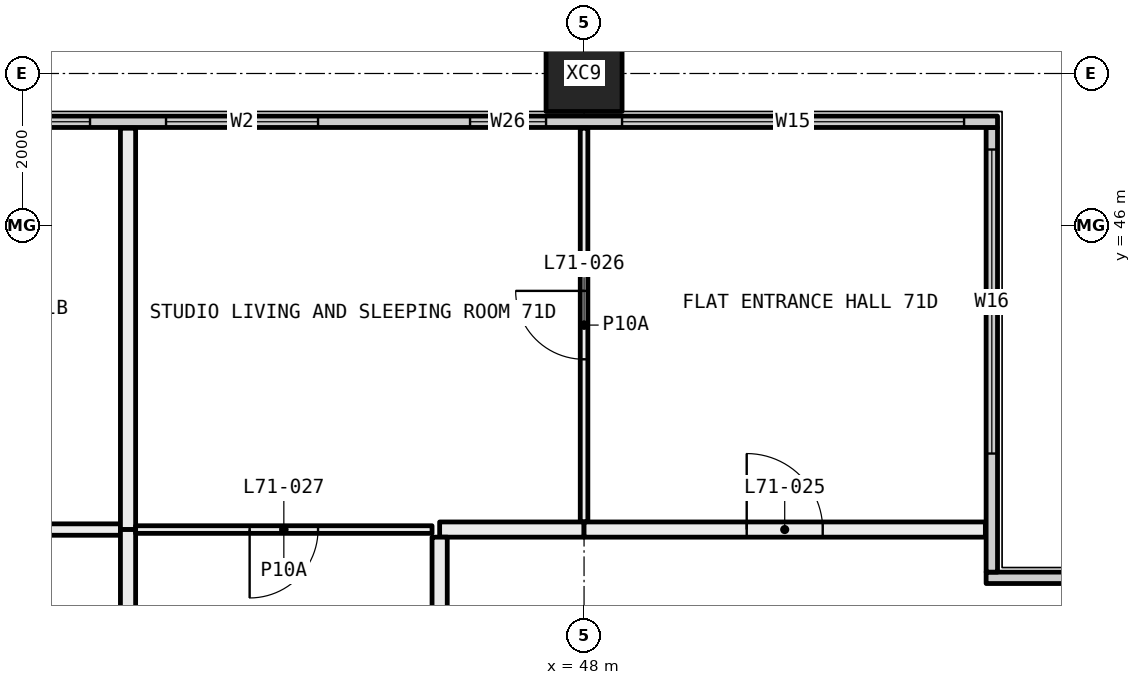
"""IFC4 building model, lengths in metres.
Left out: names, types, materials, properties, quantities, classifications, styles, units other than length and angle.
Written with IfcOpenShell. Run it as: python <this file> out.ifc"""

import sys

from ifc_helpers import new_model, si_unit, direction, frame, frame_2d, origin, origin_2d, place, context, subcontext, project, spatial, rectangle, hollow_rectangle, extrude, element, fill, save


model = new_model("IFC4")
c1 = context("Model", 3, precision=1e-05, world=origin(), true_north=direction((0.0, 1.0)))
c2 = subcontext(c1, "Body", "Model", "MODEL_VIEW")
j1 = project(units=[si_unit("LENGTHUNIT", "METRE"), si_unit("PLANEANGLEUNIT", "RADIAN")], contexts=[c1])
p1 = place(None, origin())
s1 = spatial("IfcSite", under=j1, at=p1, CompositionType="ELEMENT")
p2 = place(p1, origin())
s2 = spatial("IfcBuilding", under=s1, at=p2, CompositionType="ELEMENT")
p3 = place(p2, frame((0.0, 0.0, 262.8)))
s3 = spatial("IfcBuildingStorey", under=s2, at=p3, CompositionType="ELEMENT", Elevation=262.8)
p4 = place(p3, frame((48.0, 48.0, -0.4), z_axis=(0.0, 0.0, 1.0), x_axis=(1.0, 0.0, 0.0)))
e1 = element("IfcColumn", 1, at=p4, inside=s3, PredefinedType="COLUMN", context=c2, shape_type="SweptSolid", body=[
    extrude(hollow_rectangle(XDim=1.0, YDim=1.0, WallThickness=0.036, at=origin_2d()), origin(), (0.0, 0.0, 1.0), 3.45),
])
p5 = place(p3, frame((53.29, 41.365, 0.0), z_axis=(0.0, 0.0, 1.0), x_axis=(1.0, 0.0, 0.0)))
e2 = element("IfcWall", 2, at=p5, inside=s3, PredefinedType="ELEMENTEDWALL", context=c2, shape_type="SweptSolid", body=[
    extrude(rectangle(XDim=6.15, YDim=0.15, at=frame_2d((3.075, 0.0))), origin(), (0.0, 0.0, 1.0), 3.05),
])
p6 = place(p5, frame((1.71, 0.0, 0.45)))
e3 = element("IfcOpeningElement", 3, at=p6, cuts=e2, PredefinedType="OPENING", context=c2, shape_type="SweptSolid", body=[
    extrude(rectangle(XDim=4.0, YDim=2.55, at=frame_2d((2.0, 1.275))), frame((0.0, 0.085, 0.0), z_axis=(0.0, -1.0, 0.0), x_axis=(1.0, 0.0, 0.0)), (0.0, 0.0, 1.0), 0.17),
])
p7 = place(p3, frame((53.365, 41.44, 0.0), z_axis=(0.0, 0.0, 1.0), x_axis=(0.0, 1.0, 0.0)))
e4 = element("IfcWall", 4, at=p7, inside=s3, PredefinedType="ELEMENTEDWALL", context=c2, shape_type="SweptSolid", body=[
    extrude(rectangle(XDim=5.85, YDim=0.15, at=frame_2d((2.925, 0.0))), origin(), (0.0, 0.0, 1.0), 3.05),
])
p8 = place(p7, frame((1.56, 0.0, 0.45)))
e5 = element("IfcOpeningElement", 5, at=p8, cuts=e4, PredefinedType="OPENING", context=c2, shape_type="SweptSolid", body=[
    extrude(rectangle(XDim=4.0, YDim=2.55, at=frame_2d((2.0, 1.275))), frame((0.0, 0.085, 0.0), z_axis=(0.0, -1.0, 0.0), x_axis=(1.0, 0.0, 0.0)), (0.0, 0.0, 1.0), 0.17),
])
p9 = place(p3, frame((18.56, 47.365, 0.0), z_axis=(0.0, 0.0, 1.0), x_axis=(1.0, 0.0, 0.0)))
e6 = element("IfcWall", 6, at=p9, inside=s3, PredefinedType="ELEMENTEDWALL", context=c2, shape_type="SweptSolid", body=[
    extrude(rectangle(XDim=34.88, YDim=0.15, at=frame_2d((17.44, 0.0))), origin(), (0.0, 0.0, 1.0), 3.05),
])
p10 = place(p9, frame((0.44, 0.0, 0.45)))
e7 = element("IfcOpeningElement", 7, at=p10, cuts=e6, PredefinedType="OPENING", context=c2, shape_type="SweptSolid", body=[
    extrude(rectangle(XDim=4.5, YDim=2.55, at=frame_2d((2.25, 1.275))), frame((0.0, 0.085, 0.0), z_axis=(0.0, -1.0, 0.0), x_axis=(1.0, 0.0, 0.0)), (0.0, 0.0, 1.0), 0.17),
])
p11 = place(p9, frame((5.94, 0.0, 0.45)))
e8 = element("IfcOpeningElement", 8, at=p11, cuts=e6, PredefinedType="OPENING", context=c2, shape_type="SweptSolid", body=[
    extrude(rectangle(XDim=1.0, YDim=2.55, at=frame_2d((0.5, 1.275))), frame((0.0, 0.085, 0.0), z_axis=(0.0, -1.0, 0.0), x_axis=(1.0, 0.0, 0.0)), (0.0, 0.0, 1.0), 0.17),
])
p12 = place(p9, frame((8.94, 0.0, 0.45)))
e9 = element("IfcOpeningElement", 9, at=p12, cuts=e6, PredefinedType="OPENING", context=c2, shape_type="SweptSolid", body=[
    extrude(rectangle(XDim=2.0, YDim=2.55, at=frame_2d((1.0, 1.275))), frame((0.0, 0.085, 0.0), z_axis=(0.0, -1.0, 0.0), x_axis=(1.0, 0.0, 0.0)), (0.0, 0.0, 1.0), 0.17),
])
p13 = place(p9, frame((11.94, 0.0, 0.45)))
e10 = element("IfcOpeningElement", 10, at=p13, cuts=e6, PredefinedType="OPENING", context=c2, shape_type="SweptSolid", body=[
    extrude(rectangle(XDim=2.0, YDim=2.55, at=frame_2d((1.0, 1.275))), frame((0.0, 0.085, 0.0), z_axis=(0.0, -1.0, 0.0), x_axis=(1.0, 0.0, 0.0)), (0.0, 0.0, 1.0), 0.17),
])
p14 = place(p9, frame((15.94, 0.0, 0.45)))
e11 = element("IfcOpeningElement", 11, at=p14, cuts=e6, PredefinedType="OPENING", context=c2, shape_type="SweptSolid", body=[
    extrude(rectangle(XDim=1.0, YDim=2.55, at=frame_2d((0.5, 1.275))), frame((0.0, 0.085, 0.0), z_axis=(0.0, -1.0, 0.0), x_axis=(1.0, 0.0, 0.0)), (0.0, 0.0, 1.0), 0.17),
])
p15 = place(p9, frame((17.94, 0.0, 0.45)))
e12 = element("IfcOpeningElement", 12, at=p15, cuts=e6, PredefinedType="OPENING", context=c2, shape_type="SweptSolid", body=[
    extrude(rectangle(XDim=1.0, YDim=2.55, at=frame_2d((0.5, 1.275))), frame((0.0, 0.085, 0.0), z_axis=(0.0, -1.0, 0.0), x_axis=(1.0, 0.0, 0.0)), (0.0, 0.0, 1.0), 0.17),
])
p16 = place(p9, frame((20.94, 0.0, 0.45)))
e13 = element("IfcOpeningElement", 13, at=p16, cuts=e6, PredefinedType="OPENING", context=c2, shape_type="SweptSolid", body=[
    extrude(rectangle(XDim=2.0, YDim=2.55, at=frame_2d((1.0, 1.275))), frame((0.0, 0.085, 0.0), z_axis=(0.0, -1.0, 0.0), x_axis=(1.0, 0.0, 0.0)), (0.0, 0.0, 1.0), 0.17),
])
p17 = place(p9, frame((23.94, 0.0, 0.45)))
e14 = element("IfcOpeningElement", 14, at=p17, cuts=e6, PredefinedType="OPENING", context=c2, shape_type="SweptSolid", body=[
    extrude(rectangle(XDim=2.0, YDim=2.55, at=frame_2d((1.0, 1.275))), frame((0.0, 0.085, 0.0), z_axis=(0.0, -1.0, 0.0), x_axis=(1.0, 0.0, 0.0)), (0.0, 0.0, 1.0), 0.17),
])
p18 = place(p9, frame((27.94, 0.0, 0.45)))
e15 = element("IfcOpeningElement", 15, at=p18, cuts=e6, PredefinedType="OPENING", context=c2, shape_type="SweptSolid", body=[
    extrude(rectangle(XDim=1.0, YDim=2.55, at=frame_2d((0.5, 1.275))), frame((0.0, 0.085, 0.0), z_axis=(0.0, -1.0, 0.0), x_axis=(1.0, 0.0, 0.0)), (0.0, 0.0, 1.0), 0.17),
])
p19 = place(p9, frame((29.94, 0.0, 0.45)))
e16 = element("IfcOpeningElement", 16, at=p19, cuts=e6, PredefinedType="OPENING", context=c2, shape_type="SweptSolid", body=[
    extrude(rectangle(XDim=4.5, YDim=2.55, at=frame_2d((2.25, 1.275))), frame((0.0, 0.085, 0.0), z_axis=(0.0, -1.0, 0.0), x_axis=(1.0, 0.0, 0.0)), (0.0, 0.0, 1.0), 0.17),
])
p20 = place(p3, frame((36.0, 42.0, 0.0), z_axis=(0.0, 0.0, 1.0), x_axis=(1.0, 0.0, 0.0)))
e17 = element("IfcWall", 17, at=p20, inside=s3, PredefinedType="PARTITIONING", context=c2, shape_type="SweptSolid", body=[
    extrude(rectangle(XDim=5.9, YDim=0.15, at=frame_2d((2.95, 0.0))), origin(), (0.0, 0.0, 1.0), 2.45),
])
p21 = place(p20, frame((2.5, 0.0, 0.0)))
e18 = element("IfcOpeningElement", 18, at=p21, cuts=e17, PredefinedType="OPENING", context=c2, shape_type="SweptSolid", body=[
    extrude(rectangle(XDim=0.9, YDim=2.1, at=frame_2d((0.45, 1.05))), frame((0.0, 0.085, 0.0), z_axis=(0.0, -1.0, 0.0), x_axis=(1.0, 0.0, 0.0)), (0.0, 0.0, 1.0), 0.17),
])
p22 = place(p3, frame((42.0, 42.0, 0.0), z_axis=(0.0, 0.0, 1.0), x_axis=(0.0, 1.0, 0.0)))
e19 = element("IfcWall", 19, at=p22, inside=s3, PredefinedType="PARTITIONING", context=c2, shape_type="SweptSolid", body=[
    extrude(rectangle(XDim=5.28, YDim=0.2, at=frame_2d((2.64, 0.0))), origin(), (0.0, 0.0, 1.0), 3.05),
])
p23 = place(p3, frame((42.0, 38.1, 0.0), z_axis=(0.0, 0.0, 1.0), x_axis=(0.0, 1.0, 0.0)))
e20 = element("IfcWall", 20, at=p23, inside=s3, PredefinedType="PARTITIONING", context=c2, shape_type="SweptSolid", body=[
    extrude(rectangle(XDim=3.9, YDim=0.2, at=frame_2d((1.95, 0.0))), origin(), (0.0, 0.0, 1.0), 3.05),
])
p24 = place(p3, frame((48.0, 42.1, 0.0), z_axis=(0.0, 0.0, 1.0), x_axis=(0.0, 1.0, 0.0)))
e21 = element("IfcWall", 21, at=p24, inside=s3, PredefinedType="PARTITIONING", context=c2, shape_type="SweptSolid", body=[
    extrude(rectangle(XDim=5.18, YDim=0.1, at=frame_2d((2.59, 0.0))), origin(), (0.0, 0.0, 1.0), 3.05),
])
p25 = place(p24, frame((2.14, 0.0, 0.0)))
e22 = element("IfcOpeningElement", 22, at=p25, cuts=e21, PredefinedType="OPENING", context=c2, shape_type="SweptSolid", body=[
    extrude(rectangle(XDim=0.9, YDim=2.1, at=frame_2d((0.45, 1.05))), frame((0.0, 0.06, 0.0), z_axis=(0.0, -1.0, 0.0), x_axis=(1.0, 0.0, 0.0)), (0.0, 0.0, 1.0), 0.12),
])
p26 = place(p3, frame((42.1, 42.0, 0.0), z_axis=(0.0, 0.0, 1.0), x_axis=(1.0, 0.0, 0.0)))
e23 = element("IfcWall", 23, at=p26, inside=s3, PredefinedType="PARTITIONING", context=c2, shape_type="SweptSolid", body=[
    extrude(rectangle(XDim=3.9, YDim=0.1, at=frame_2d((1.95, 0.0))), origin(), (0.0, 0.0, 1.0), 3.05),
])
p27 = place(p26, frame((1.5, 0.0, 0.0)))
e24 = element("IfcOpeningElement", 24, at=p27, cuts=e23, PredefinedType="OPENING", context=c2, shape_type="SweptSolid", body=[
    extrude(rectangle(XDim=0.9, YDim=2.1, at=frame_2d((0.45, 1.05))), frame((0.0, 0.06, 0.0), z_axis=(0.0, -1.0, 0.0), x_axis=(1.0, 0.0, 0.0)), (0.0, 0.0, 1.0), 0.12),
])
p28 = place(p3, frame((46.1, 42.0, 0.0), z_axis=(0.0, 0.0, 1.0), x_axis=(1.0, 0.0, 0.0)))
e25 = element("IfcWall", 25, at=p28, inside=s3, PredefinedType="PARTITIONING", context=c2, shape_type="SweptSolid", body=[
    extrude(rectangle(XDim=1.9, YDim=0.2, at=frame_2d((0.95, 0.0))), origin(), (0.0, 0.0, 1.0), 3.05),
])
p29 = place(p3, frame((48.0, 42.0, 0.0), z_axis=(0.0, 0.0, 1.0), x_axis=(1.0, 0.0, 0.0)))
e26 = element("IfcWall", 26, at=p29, inside=s3, PredefinedType="PARTITIONING", context=c2, shape_type="SweptSolid", body=[
    extrude(rectangle(XDim=5.28, YDim=0.2, at=frame_2d((2.64, 0.0))), origin(), (0.0, 0.0, 1.0), 3.05),
])
p30 = place(p29, frame((2.14, 0.0, 0.0)))
e27 = element("IfcOpeningElement", 27, at=p30, cuts=e26, PredefinedType="OPENING", context=c2, shape_type="SweptSolid", body=[
    extrude(rectangle(XDim=1.0, YDim=2.1, at=frame_2d((0.5, 1.05))), frame((0.0, 0.11, 0.0), z_axis=(0.0, -1.0, 0.0), x_axis=(1.0, 0.0, 0.0)), (0.0, 0.0, 1.0), 0.22),
])
p31 = place(p3, frame((46.1, 36.1, 0.0), z_axis=(0.0, 0.0, 1.0), x_axis=(0.0, 1.0, 0.0)))
e28 = element("IfcWall", 28, at=p31, inside=s3, PredefinedType="PARTITIONING", context=c2, shape_type="SweptSolid", body=[
    extrude(rectangle(XDim=5.8, YDim=0.2, at=frame_2d((2.9, 0.0))), origin(), (0.0, 0.0, 1.0), 3.05),
])
p32 = place(p8, origin())
e29 = element("IfcWindow", 29, at=p32, inside=s3, PartitioningType="SINGLE_PANEL", PredefinedType="WINDOW", context=c2, shape_type="SweptSolid", body=[
    extrude(rectangle(XDim=4.0, YDim=2.55, at=frame_2d((2.0, 1.275))), frame((0.0, 0.03, 0.0), z_axis=(0.0, -1.0, 0.0), x_axis=(1.0, 0.0, 0.0)), (0.0, 0.0, 1.0), 0.06),
])
fill(e5, e29)
p33 = place(p16, origin())
e30 = element("IfcWindow", 30, at=p33, inside=s3, PartitioningType="SINGLE_PANEL", PredefinedType="WINDOW", context=c2, shape_type="SweptSolid", body=[
    extrude(rectangle(XDim=2.0, YDim=2.55, at=frame_2d((1.0, 1.275))), frame((0.0, 0.03, 0.0), z_axis=(0.0, -1.0, 0.0), x_axis=(1.0, 0.0, 0.0)), (0.0, 0.0, 1.0), 0.06),
])
fill(e13, e30)
p34 = place(p17, origin())
e31 = element("IfcWindow", 31, at=p34, inside=s3, PartitioningType="SINGLE_PANEL", PredefinedType="WINDOW", context=c2, shape_type="SweptSolid", body=[
    extrude(rectangle(XDim=2.0, YDim=2.55, at=frame_2d((1.0, 1.275))), frame((0.0, 0.03, 0.0), z_axis=(0.0, -1.0, 0.0), x_axis=(1.0, 0.0, 0.0)), (0.0, 0.0, 1.0), 0.06),
])
fill(e14, e31)
p35 = place(p18, origin())
e32 = element("IfcWindow", 32, at=p35, inside=s3, PartitioningType="SINGLE_PANEL", PredefinedType="WINDOW", context=c2, shape_type="SweptSolid", body=[
    extrude(rectangle(XDim=1.0, YDim=2.55, at=frame_2d((0.5, 1.275))), frame((0.0, 0.03, 0.0), z_axis=(0.0, -1.0, 0.0), x_axis=(1.0, 0.0, 0.0)), (0.0, 0.0, 1.0), 0.06),
])
fill(e15, e32)
p36 = place(p19, origin())
e33 = element("IfcWindow", 33, at=p36, inside=s3, PartitioningType="SINGLE_PANEL", PredefinedType="WINDOW", context=c2, shape_type="SweptSolid", body=[
    extrude(rectangle(XDim=4.5, YDim=2.55, at=frame_2d((2.25, 1.275))), frame((0.0, 0.03, 0.0), z_axis=(0.0, -1.0, 0.0), x_axis=(1.0, 0.0, 0.0)), (0.0, 0.0, 1.0), 0.06),
])
fill(e16, e33)
p37 = place(p30, origin())
e34 = element("IfcDoor", 34, at=p37, inside=s3, OperationType="SINGLE_SWING_RIGHT", PredefinedType="DOOR", context=c2, shape_type="SweptSolid", body=[
    extrude(rectangle(XDim=1.0, YDim=2.1, at=frame_2d((0.5, 1.05))), frame((0.0, 0.025, 0.0), z_axis=(0.0, -1.0, 0.0), x_axis=(1.0, 0.0, 0.0)), (0.0, 0.0, 1.0), 0.05),
])
fill(e27, e34)
p38 = place(p25, origin())
e35 = element("IfcDoor", 35, at=p38, inside=s3, OperationType="SINGLE_SWING_LEFT", PredefinedType="DOOR", context=c2, shape_type="SweptSolid", body=[
    extrude(rectangle(XDim=0.9, YDim=2.1, at=frame_2d((0.45, 1.05))), frame((0.0, 0.025, 0.0), z_axis=(0.0, -1.0, 0.0), x_axis=(1.0, 0.0, 0.0)), (0.0, 0.0, 1.0), 0.05),
])
fill(e22, e35)
p39 = place(p27, frame((0.9, 0.0, 0.0), x_axis=(-1.0, 0.0, 0.0)))
e36 = element("IfcDoor", 36, at=p39, inside=s3, OperationType="SINGLE_SWING_LEFT", PredefinedType="DOOR", context=c2, shape_type="SweptSolid", body=[
    extrude(rectangle(XDim=0.9, YDim=2.1, at=frame_2d((0.45, 1.05))), frame((0.0, 0.025, 0.0), z_axis=(0.0, -1.0, 0.0), x_axis=(1.0, 0.0, 0.0)), (0.0, 0.0, 1.0), 0.05),
])
fill(e24, e36)
save(model, sys.argv[1])
